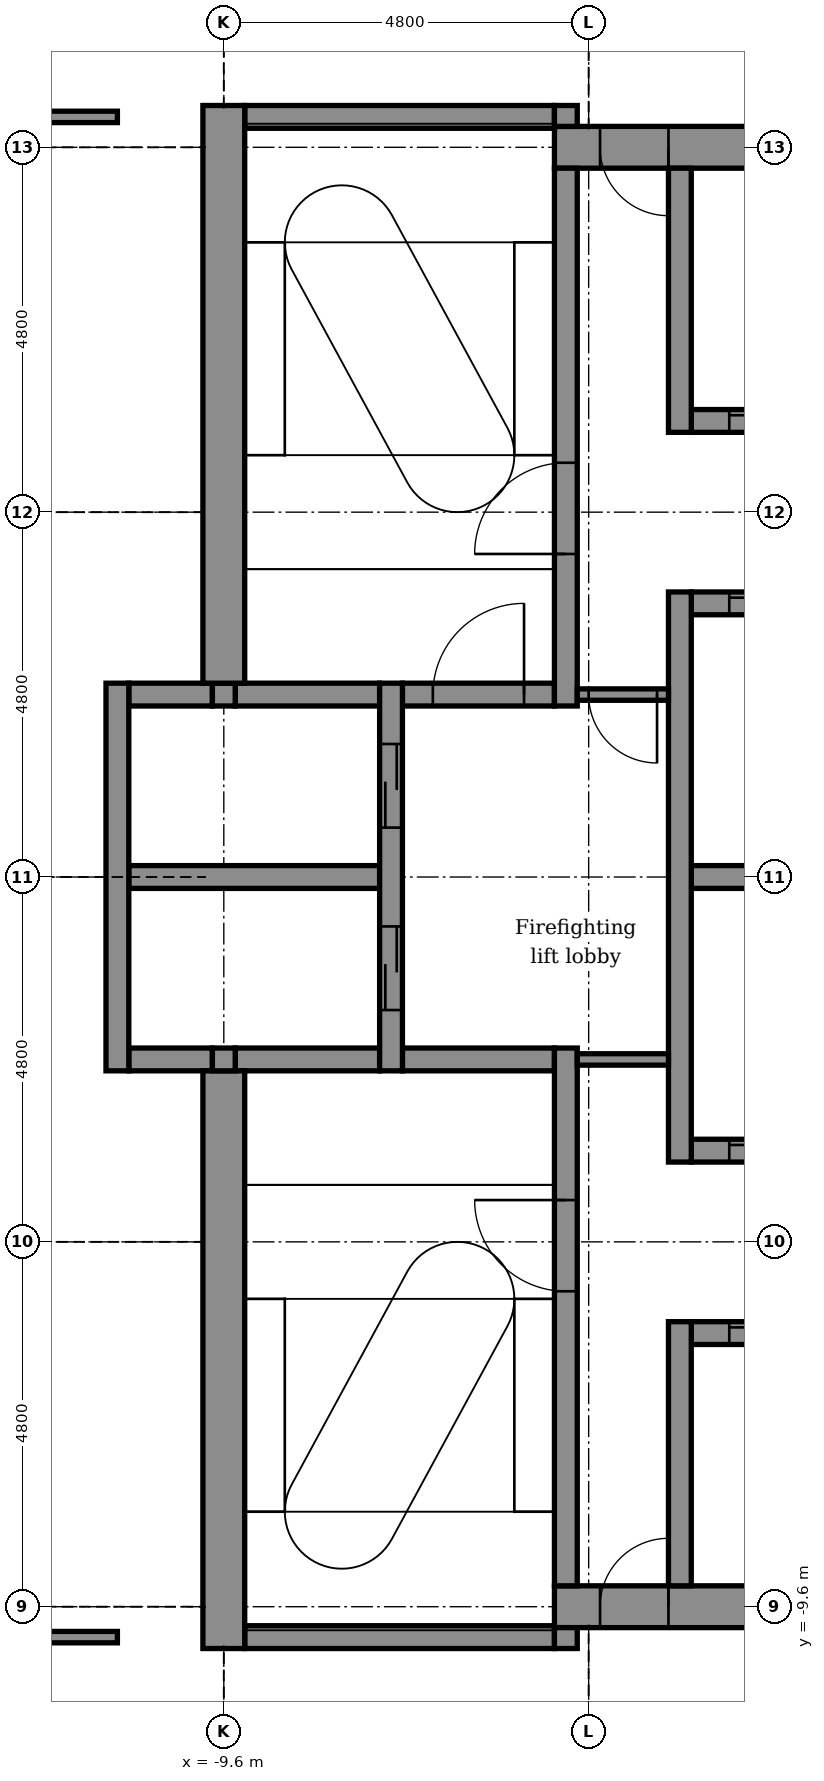
"""IFC4 building model, lengths in metres.
Left out: names, types, materials, properties, quantities, classifications, styles, units other than length and angle.
Written with IfcOpenShell. Run it as: python <this file> out.ifc"""

import sys

from ifc_helpers import new_model, si_unit, direction, frame, frame_2d, origin, place, context, subcontext, project, spatial, rectangle, extrude, element, fill, save


model = new_model("IFC4")
c1 = context("Model", 3, precision=1e-05, world=origin(), true_north=direction((0.0, 1.0)))
c2 = subcontext(c1, "Body", "Model", "MODEL_VIEW")
j1 = project(units=[si_unit("LENGTHUNIT", "METRE"), si_unit("PLANEANGLEUNIT", "RADIAN")], contexts=[c1])
p1 = place(None, origin())
s1 = spatial("IfcSite", under=j1, at=p1, CompositionType="ELEMENT")
p2 = place(p1, origin())
s2 = spatial("IfcBuilding", under=s1, at=p2, CompositionType="ELEMENT")
p3 = place(p2, frame((0.0, 0.0, 269.6)))
s3 = spatial("IfcBuildingStorey", under=s2, at=p3, CompositionType="ELEMENT", Elevation=269.6)
p4 = place(p3, frame((-9.325, -10.0, -0.15), z_axis=(0.0, 0.0, 1.0), x_axis=(1.0, 0.0, 0.0)))
e1 = element("IfcWall", 1, at=p4, inside=s3, PredefinedType="STANDARD", context=c2, shape_type="SweptSolid", body=[
    extrude(rectangle(XDim=4.075, YDim=0.3, at=frame_2d((2.038, 0.0))), origin(), (0.0, 0.0, 1.0), 3.9),
])
p5 = place(p3, frame((-5.25, -9.6, -0.15), z_axis=(0.0, 0.0, 1.0), x_axis=(1.0, 0.0, 0.0)))
e2 = element("IfcWall", 2, at=p5, inside=s3, PredefinedType="SHEAR", context=c2, shape_type="SweptSolid", body=[
    extrude(rectangle(XDim=10.2, YDim=0.55, at=frame_2d((5.1, 0.0))), origin(), (0.0, 0.0, 1.0), 3.9),
])
p6 = place(p5, frame((0.6, 0.0, 0.15)))
e3 = element("IfcOpeningElement", 3, at=p6, cuts=e2, PredefinedType="OPENING", context=c2, shape_type="SweptSolid", body=[
    extrude(rectangle(XDim=0.9, YDim=2.1, at=frame_2d((0.45, 1.05))), frame((0.0, 0.285, 0.0), z_axis=(0.0, -1.0, 0.0), x_axis=(1.0, 0.0, 0.0)), (0.0, 0.0, 1.0), 0.57),
])
p7 = place(p3, frame((-3.45, -6.0, -0.15), z_axis=(0.0, 0.0, 1.0), x_axis=(1.0, 0.0, 0.0)))
e4 = element("IfcWall", 4, at=p7, inside=s3, PredefinedType="STANDARD", context=c2, shape_type="SweptSolid", body=[
    extrude(rectangle(XDim=2.1, YDim=0.3, at=frame_2d((1.05, 0.0))), origin(), (0.0, 0.0, 1.0), 3.9),
])
p8 = place(p7, frame((0.5, 0.0, 0.15)))
e5 = element("IfcOpeningElement", 5, at=p8, cuts=e4, PredefinedType="OPENING", context=c2, shape_type="SweptSolid", body=[
    extrude(rectangle(XDim=1.1, YDim=2.1, at=frame_2d((0.55, 1.05))), frame((0.0, 0.16, 0.0), z_axis=(0.0, -1.0, 0.0), x_axis=(1.0, 0.0, 0.0)), (0.0, 0.0, 1.0), 0.32),
])
p9 = place(p3, frame((-3.45, -3.6, -0.15), z_axis=(0.0, 0.0, 1.0), x_axis=(1.0, 0.0, 0.0)))
e6 = element("IfcWall", 6, at=p9, inside=s3, PredefinedType="STANDARD", context=c2, shape_type="SweptSolid", body=[
    extrude(rectangle(XDim=2.1, YDim=0.3, at=frame_2d((1.05, 0.0))), origin(), (0.0, 0.0, 1.0), 3.9),
])
p10 = place(p9, frame((0.5, 0.0, 0.15)))
e7 = element("IfcOpeningElement", 7, at=p10, cuts=e6, PredefinedType="OPENING", context=c2, shape_type="SweptSolid", body=[
    extrude(rectangle(XDim=1.1, YDim=2.1, at=frame_2d((0.55, 1.05))), frame((0.0, 0.16, 0.0), z_axis=(0.0, -1.0, 0.0), x_axis=(1.0, 0.0, 0.0)), (0.0, 0.0, 1.0), 0.32),
])
p11 = place(p3, frame((-10.85, -2.4, -0.15), z_axis=(0.0, 0.0, 1.0), x_axis=(1.0, 0.0, 0.0)))
e8 = element("IfcWall", 8, at=p11, inside=s3, PredefinedType="STANDARD", context=c2, shape_type="SweptSolid", body=[
    extrude(rectangle(XDim=1.1, YDim=0.3, at=frame_2d((0.55, 0.0))), origin(), (0.0, 0.0, 1.0), 3.9),
])
p12 = place(p3, frame((-9.45, -2.4, -0.15), z_axis=(0.0, 0.0, 1.0), x_axis=(1.0, 0.0, 0.0)))
e9 = element("IfcWall", 9, at=p12, inside=s3, PredefinedType="STANDARD", context=c2, shape_type="SweptSolid", body=[
    extrude(rectangle(XDim=1.9, YDim=0.3, at=frame_2d((0.95, 0.0))), origin(), (0.0, 0.0, 1.0), 3.9),
])
p13 = place(p3, frame((-7.25, -2.4, -0.15), z_axis=(0.0, 0.0, 1.0), x_axis=(1.0, 0.0, 0.0)))
e10 = element("IfcWall", 10, at=p13, inside=s3, PredefinedType="STANDARD", context=c2, shape_type="SweptSolid", body=[
    extrude(rectangle(XDim=2.0, YDim=0.3, at=frame_2d((1.0, 0.0))), origin(), (0.0, 0.0, 1.0), 3.9),
])
p14 = place(p3, frame((-10.85, 0.0, -0.15), z_axis=(0.0, 0.0, 1.0), x_axis=(1.0, 0.0, 0.0)))
e11 = element("IfcWall", 11, at=p14, inside=s3, PredefinedType="STANDARD", context=c2, shape_type="SweptSolid", body=[
    extrude(rectangle(XDim=3.3, YDim=0.3, at=frame_2d((1.65, 0.0))), origin(), (0.0, 0.0, 1.0), 3.9),
])
p15 = place(p3, frame((-3.45, 0.0, -0.15), z_axis=(0.0, 0.0, 1.0), x_axis=(1.0, 0.0, 0.0)))
e12 = element("IfcWall", 12, at=p15, inside=s3, PredefinedType="STANDARD", context=c2, shape_type="SweptSolid", body=[
    extrude(rectangle(XDim=2.1, YDim=0.3, at=frame_2d((1.05, 0.0))), origin(), (0.0, 0.0, 1.0), 3.9),
])
p16 = place(p3, frame((-10.85, 2.4, -0.15), z_axis=(0.0, 0.0, 1.0), x_axis=(1.0, 0.0, 0.0)))
e13 = element("IfcWall", 13, at=p16, inside=s3, PredefinedType="STANDARD", context=c2, shape_type="SweptSolid", body=[
    extrude(rectangle(XDim=1.1, YDim=0.3, at=frame_2d((0.55, 0.0))), origin(), (0.0, 0.0, 1.0), 3.9),
])
p17 = place(p3, frame((-9.45, 2.4, -0.15), z_axis=(0.0, 0.0, 1.0), x_axis=(1.0, 0.0, 0.0)))
e14 = element("IfcWall", 14, at=p17, inside=s3, PredefinedType="STANDARD", context=c2, shape_type="SweptSolid", body=[
    extrude(rectangle(XDim=1.9, YDim=0.3, at=frame_2d((0.95, 0.0))), origin(), (0.0, 0.0, 1.0), 3.9),
])
p18 = place(p3, frame((-7.25, 2.4, -0.15), z_axis=(0.0, 0.0, 1.0), x_axis=(1.0, 0.0, 0.0)))
e15 = element("IfcWall", 15, at=p18, inside=s3, PredefinedType="STANDARD", context=c2, shape_type="SweptSolid", body=[
    extrude(rectangle(XDim=2.0, YDim=0.3, at=frame_2d((1.0, 0.0))), origin(), (0.0, 0.0, 1.0), 3.9),
])
p19 = place(p18, frame((0.4, 0.0, 0.15)))
e16 = element("IfcOpeningElement", 16, at=p19, cuts=e15, PredefinedType="OPENING", context=c2, shape_type="SweptSolid", body=[
    extrude(rectangle(XDim=1.2, YDim=2.1, at=frame_2d((0.6, 1.05))), frame((0.0, 0.16, 0.0), z_axis=(0.0, -1.0, 0.0), x_axis=(1.0, 0.0, 0.0)), (0.0, 0.0, 1.0), 0.32),
])
p20 = place(p3, frame((-3.45, 3.6, -0.15), z_axis=(0.0, 0.0, 1.0), x_axis=(1.0, 0.0, 0.0)))
e17 = element("IfcWall", 17, at=p20, inside=s3, PredefinedType="STANDARD", context=c2, shape_type="SweptSolid", body=[
    extrude(rectangle(XDim=2.1, YDim=0.3, at=frame_2d((1.05, 0.0))), origin(), (0.0, 0.0, 1.0), 3.9),
])
p21 = place(p20, frame((0.5, 0.0, 0.15)))
e18 = element("IfcOpeningElement", 18, at=p21, cuts=e17, PredefinedType="OPENING", context=c2, shape_type="SweptSolid", body=[
    extrude(rectangle(XDim=1.1, YDim=2.1, at=frame_2d((0.55, 1.05))), frame((0.0, 0.16, 0.0), z_axis=(0.0, -1.0, 0.0), x_axis=(1.0, 0.0, 0.0)), (0.0, 0.0, 1.0), 0.32),
])
p22 = place(p3, frame((-3.45, 6.0, -0.15), z_axis=(0.0, 0.0, 1.0), x_axis=(1.0, 0.0, 0.0)))
e19 = element("IfcWall", 19, at=p22, inside=s3, PredefinedType="STANDARD", context=c2, shape_type="SweptSolid", body=[
    extrude(rectangle(XDim=2.1, YDim=0.3, at=frame_2d((1.05, 0.0))), origin(), (0.0, 0.0, 1.0), 3.9),
])
p23 = place(p22, frame((0.5, 0.0, 0.15)))
e20 = element("IfcOpeningElement", 20, at=p23, cuts=e19, PredefinedType="OPENING", context=c2, shape_type="SweptSolid", body=[
    extrude(rectangle(XDim=1.1, YDim=2.1, at=frame_2d((0.55, 1.05))), frame((0.0, 0.16, 0.0), z_axis=(0.0, -1.0, 0.0), x_axis=(1.0, 0.0, 0.0)), (0.0, 0.0, 1.0), 0.32),
])
p24 = place(p3, frame((-5.25, 9.6, -0.15), z_axis=(0.0, 0.0, 1.0), x_axis=(1.0, 0.0, 0.0)))
e21 = element("IfcWall", 21, at=p24, inside=s3, PredefinedType="SHEAR", context=c2, shape_type="SweptSolid", body=[
    extrude(rectangle(XDim=14.575, YDim=0.55, at=frame_2d((7.288, 0.0))), origin(), (0.0, 0.0, 1.0), 3.9),
])
p25 = place(p24, frame((0.6, 0.0, 0.15)))
e22 = element("IfcOpeningElement", 22, at=p25, cuts=e21, PredefinedType="OPENING", context=c2, shape_type="SweptSolid", body=[
    extrude(rectangle(XDim=0.9, YDim=2.1, at=frame_2d((0.45, 1.05))), frame((0.0, 0.285, 0.0), z_axis=(0.0, -1.0, 0.0), x_axis=(1.0, 0.0, 0.0)), (0.0, 0.0, 1.0), 0.57),
])
p26 = place(p3, frame((-9.325, 10.0, -0.15), z_axis=(0.0, 0.0, 1.0), x_axis=(1.0, 0.0, 0.0)))
e23 = element("IfcWall", 23, at=p26, inside=s3, PredefinedType="STANDARD", context=c2, shape_type="SweptSolid", body=[
    extrude(rectangle(XDim=4.075, YDim=0.3, at=frame_2d((2.038, 0.0))), origin(), (0.0, 0.0, 1.0), 3.9),
])
p27 = place(p3, frame((-11.0, -2.55, -0.15), z_axis=(0.0, 0.0, 1.0), x_axis=(0.0, 1.0, 0.0)))
e24 = element("IfcWall", 24, at=p27, inside=s3, PredefinedType="STANDARD", context=c2, shape_type="SweptSolid", body=[
    extrude(rectangle(XDim=5.1, YDim=0.3, at=frame_2d((2.55, 0.0))), origin(), (0.0, 0.0, 1.0), 3.9),
])
p28 = place(p3, frame((-9.6, -10.15, -0.15), z_axis=(0.0, 0.0, 1.0), x_axis=(0.0, 1.0, 0.0)))
e25 = element("IfcWall", 25, at=p28, inside=s3, PredefinedType="SHEAR", context=c2, shape_type="SweptSolid", body=[
    extrude(rectangle(XDim=7.6, YDim=0.55, at=frame_2d((3.8, 0.0))), origin(), (0.0, 0.0, 1.0), 3.9),
])
for number, where, z_axis, x_axis in (
    (26, (-9.6, -2.55, -0.15), (0.0, 0.0, 1.0), (0.0, 1.0, 0.0)),
    (27, (-9.6, 2.25, -0.15), (0.0, 0.0, 1.0), (0.0, 1.0, 0.0)),
):
    element("IfcWall", number, at=place(p3, frame(where, z_axis=z_axis, x_axis=x_axis)), inside=s3, PredefinedType="STANDARD", context=c2, shape_type="SweptSolid", body=[
        extrude(rectangle(XDim=0.3, YDim=0.3, at=frame_2d((0.15, 0.0))), origin(), (0.0, 0.0, 1.0), 3.9),
    ])
p29 = place(p3, frame((-9.6, 2.55, -0.15), z_axis=(0.0, 0.0, 1.0), x_axis=(0.0, 1.0, 0.0)))
e28 = element("IfcWall", 28, at=p29, inside=s3, PredefinedType="SHEAR", context=c2, shape_type="SweptSolid", body=[
    extrude(rectangle(XDim=7.6, YDim=0.55, at=frame_2d((3.8, 0.0))), origin(), (0.0, 0.0, 1.0), 3.9),
])
p30 = place(p3, frame((-7.4, -2.55, -0.15), z_axis=(0.0, 0.0, 1.0), x_axis=(0.0, 1.0, 0.0)))
e29 = element("IfcWall", 29, at=p30, inside=s3, PredefinedType="STANDARD", context=c2, shape_type="SweptSolid", body=[
    extrude(rectangle(XDim=5.1, YDim=0.3, at=frame_2d((2.55, 0.0))), origin(), (0.0, 0.0, 1.0), 3.9),
])
p31 = place(p30, frame((0.8, 0.0, 0.15)))
e30 = element("IfcOpeningElement", 30, at=p31, cuts=e29, PredefinedType="OPENING", context=c2, shape_type="SweptSolid", body=[
    extrude(rectangle(XDim=1.1, YDim=2.1, at=frame_2d((0.55, 1.05))), frame((0.0, 0.16, 0.0), z_axis=(0.0, -1.0, 0.0), x_axis=(1.0, 0.0, 0.0)), (0.0, 0.0, 1.0), 0.32),
])
p32 = place(p30, frame((3.2, 0.0, 0.15)))
e31 = element("IfcOpeningElement", 31, at=p32, cuts=e29, PredefinedType="OPENING", context=c2, shape_type="SweptSolid", body=[
    extrude(rectangle(XDim=1.1, YDim=2.1, at=frame_2d((0.55, 1.05))), frame((0.0, 0.16, 0.0), z_axis=(0.0, -1.0, 0.0), x_axis=(1.0, 0.0, 0.0)), (0.0, 0.0, 1.0), 0.32),
])
p33 = place(p3, frame((-5.1, -10.15, -0.15), z_axis=(0.0, 0.0, 1.0), x_axis=(0.0, 1.0, 0.0)))
e32 = element("IfcWall", 32, at=p33, inside=s3, PredefinedType="STANDARD", context=c2, shape_type="SweptSolid", body=[
    extrude(rectangle(XDim=0.275, YDim=0.3, at=frame_2d((0.137, 0.0))), origin(), (0.0, 0.0, 1.0), 3.9),
])
p34 = place(p3, frame((-5.1, -9.325, -0.15), z_axis=(0.0, 0.0, 1.0), x_axis=(0.0, 1.0, 0.0)))
e33 = element("IfcWall", 33, at=p34, inside=s3, PredefinedType="STANDARD", context=c2, shape_type="SweptSolid", body=[
    extrude(rectangle(XDim=7.075, YDim=0.3, at=frame_2d((3.538, 0.0))), origin(), (0.0, 0.0, 1.0), 3.9),
])
p35 = place(p34, frame((3.875, 0.0, 0.15)))
e34 = element("IfcOpeningElement", 34, at=p35, cuts=e33, PredefinedType="OPENING", context=c2, shape_type="SweptSolid", body=[
    extrude(rectangle(XDim=1.2, YDim=2.1, at=frame_2d((0.6, 1.05))), frame((0.0, 0.16, 0.0), z_axis=(0.0, -1.0, 0.0), x_axis=(1.0, 0.0, 0.0)), (0.0, 0.0, 1.0), 0.32),
])
p36 = place(p3, frame((-5.1, 2.25, -0.15), z_axis=(0.0, 0.0, 1.0), x_axis=(0.0, 1.0, 0.0)))
e35 = element("IfcWall", 35, at=p36, inside=s3, PredefinedType="STANDARD", context=c2, shape_type="SweptSolid", body=[
    extrude(rectangle(XDim=7.075, YDim=0.3, at=frame_2d((3.538, 0.0))), origin(), (0.0, 0.0, 1.0), 3.9),
])
p37 = place(p36, frame((2.0, 0.0, 0.15)))
e36 = element("IfcOpeningElement", 36, at=p37, cuts=e35, PredefinedType="OPENING", context=c2, shape_type="SweptSolid", body=[
    extrude(rectangle(XDim=1.2, YDim=2.1, at=frame_2d((0.6, 1.05))), frame((0.0, 0.16, 0.0), z_axis=(0.0, -1.0, 0.0), x_axis=(1.0, 0.0, 0.0)), (0.0, 0.0, 1.0), 0.32),
])
p38 = place(p3, frame((-5.1, 9.875, -0.15), z_axis=(0.0, 0.0, 1.0), x_axis=(0.0, 1.0, 0.0)))
e37 = element("IfcWall", 37, at=p38, inside=s3, PredefinedType="STANDARD", context=c2, shape_type="SweptSolid", body=[
    extrude(rectangle(XDim=0.275, YDim=0.3, at=frame_2d((0.137, 0.0))), origin(), (0.0, 0.0, 1.0), 3.9),
])
p39 = place(p3, frame((-3.6, -9.325, -0.15), z_axis=(0.0, 0.0, 1.0), x_axis=(0.0, 1.0, 0.0)))
e38 = element("IfcWall", 38, at=p39, inside=s3, PredefinedType="STANDARD", context=c2, shape_type="SweptSolid", body=[
    extrude(rectangle(XDim=3.475, YDim=0.3, at=frame_2d((1.737, 0.0))), origin(), (0.0, 0.0, 1.0), 3.9),
])
p40 = place(p3, frame((-3.6, -3.75, -0.15), z_axis=(0.0, 0.0, 1.0), x_axis=(0.0, 1.0, 0.0)))
e39 = element("IfcWall", 39, at=p40, inside=s3, PredefinedType="STANDARD", context=c2, shape_type="SweptSolid", body=[
    extrude(rectangle(XDim=7.5, YDim=0.3, at=frame_2d((3.75, 0.0))), origin(), (0.0, 0.0, 1.0), 3.9),
])
p41 = place(p3, frame((-3.6, 5.85, -0.15), z_axis=(0.0, 0.0, 1.0), x_axis=(0.0, 1.0, 0.0)))
e40 = element("IfcWall", 40, at=p41, inside=s3, PredefinedType="STANDARD", context=c2, shape_type="SweptSolid", body=[
    extrude(rectangle(XDim=3.475, YDim=0.3, at=frame_2d((1.737, 0.0))), origin(), (0.0, 0.0, 1.0), 3.9),
])
for number, where, z_axis, x_axis in (
    (41, (-14.555, -10.0, 0.0), (0.0, 0.0, 1.0), (1.0, 0.0, 0.0)),
    (42, (-14.555, 10.0, 0.0), (0.0, 0.0, 1.0), (1.0, 0.0, 0.0)),
):
    element("IfcWall", number, at=place(p3, frame(where, z_axis=z_axis, x_axis=x_axis)), inside=s3, PredefinedType="PARTITIONING", context=c2, shape_type="SweptSolid", body=[
        extrude(rectangle(XDim=3.555, YDim=0.15, at=frame_2d((1.777, 0.0))), origin(), (0.0, 0.0, 1.0), 3.75),
    ])
p42 = place(p3, frame((-4.95, 2.4, 0.0), z_axis=(0.0, 0.0, 1.0), x_axis=(1.0, 0.0, 0.0)))
e43 = element("IfcWall", 43, at=p42, inside=s3, PredefinedType="PARTITIONING", context=c2, shape_type="SweptSolid", body=[
    extrude(rectangle(XDim=1.2, YDim=0.15, at=frame_2d((0.6, 0.0))), origin(), (0.0, 0.0, 1.0), 3.75),
])
p43 = place(p42, frame((0.15, 0.0, 0.0)))
e44 = element("IfcOpeningElement", 44, at=p43, cuts=e43, PredefinedType="OPENING", context=c2, shape_type="SweptSolid", body=[
    extrude(rectangle(XDim=0.9, YDim=2.1, at=frame_2d((0.45, 1.05))), frame((0.0, 0.085, 0.0), z_axis=(0.0, -1.0, 0.0), x_axis=(1.0, 0.0, 0.0)), (0.0, 0.0, 1.0), 0.17),
])
p44 = place(p3, frame((-4.95, -2.4, 0.0), z_axis=(0.0, 0.0, 1.0), x_axis=(1.0, 0.0, 0.0)))
e45 = element("IfcWall", 45, at=p44, inside=s3, PredefinedType="PARTITIONING", context=c2, shape_type="SweptSolid", body=[
    extrude(rectangle(XDim=1.2, YDim=0.15, at=frame_2d((0.6, 0.0))), origin(), (0.0, 0.0, 1.0), 3.75),
])
p45 = place(p31, origin())
e46 = element("IfcDoor", 46, at=p45, inside=s3, OperationType="DOUBLE_DOOR_SLIDING", PredefinedType="DOOR", context=c2, shape_type="SweptSolid", body=[
    extrude(rectangle(XDim=1.1, YDim=2.1, at=frame_2d((0.55, 1.05))), frame((0.0, 0.025, 0.0), z_axis=(0.0, -1.0, 0.0), x_axis=(1.0, 0.0, 0.0)), (0.0, 0.0, 1.0), 0.05),
])
fill(e30, e46)
p46 = place(p32, origin())
e47 = element("IfcDoor", 47, at=p46, inside=s3, OperationType="DOUBLE_DOOR_SLIDING", PredefinedType="DOOR", context=c2, shape_type="SweptSolid", body=[
    extrude(rectangle(XDim=1.1, YDim=2.1, at=frame_2d((0.55, 1.05))), frame((0.0, 0.025, 0.0), z_axis=(0.0, -1.0, 0.0), x_axis=(1.0, 0.0, 0.0)), (0.0, 0.0, 1.0), 0.05),
])
fill(e31, e47)
p47 = place(p23, origin())
e48 = element("IfcDoor", 48, at=p47, inside=s3, OperationType="DOUBLE_DOOR_SLIDING", PredefinedType="DOOR", context=c2, shape_type="SweptSolid", body=[
    extrude(rectangle(XDim=1.1, YDim=2.1, at=frame_2d((0.55, 1.05))), frame((0.0, 0.025, 0.0), z_axis=(0.0, -1.0, 0.0), x_axis=(1.0, 0.0, 0.0)), (0.0, 0.0, 1.0), 0.05),
])
fill(e20, e48)
p48 = place(p21, origin())
e49 = element("IfcDoor", 49, at=p48, inside=s3, OperationType="DOUBLE_DOOR_SLIDING", PredefinedType="DOOR", context=c2, shape_type="SweptSolid", body=[
    extrude(rectangle(XDim=1.1, YDim=2.1, at=frame_2d((0.55, 1.05))), frame((0.0, 0.025, 0.0), z_axis=(0.0, -1.0, 0.0), x_axis=(1.0, 0.0, 0.0)), (0.0, 0.0, 1.0), 0.05),
])
fill(e18, e49)
p49 = place(p10, origin())
e50 = element("IfcDoor", 50, at=p49, inside=s3, OperationType="DOUBLE_DOOR_SLIDING", PredefinedType="DOOR", context=c2, shape_type="SweptSolid", body=[
    extrude(rectangle(XDim=1.1, YDim=2.1, at=frame_2d((0.55, 1.05))), frame((0.0, 0.025, 0.0), z_axis=(0.0, -1.0, 0.0), x_axis=(1.0, 0.0, 0.0)), (0.0, 0.0, 1.0), 0.05),
])
fill(e7, e50)
p50 = place(p8, origin())
e51 = element("IfcDoor", 51, at=p50, inside=s3, OperationType="DOUBLE_DOOR_SLIDING", PredefinedType="DOOR", context=c2, shape_type="SweptSolid", body=[
    extrude(rectangle(XDim=1.1, YDim=2.1, at=frame_2d((0.55, 1.05))), frame((0.0, 0.025, 0.0), z_axis=(0.0, -1.0, 0.0), x_axis=(1.0, 0.0, 0.0)), (0.0, 0.0, 1.0), 0.05),
])
fill(e5, e51)
p51 = place(p37, origin())
e52 = element("IfcDoor", 52, at=p51, inside=s3, OperationType="SINGLE_SWING_LEFT", PredefinedType="DOOR", context=c2, shape_type="SweptSolid", body=[
    extrude(rectangle(XDim=1.2, YDim=2.1, at=frame_2d((0.6, 1.05))), frame((0.0, 0.025, 0.0), z_axis=(0.0, -1.0, 0.0), x_axis=(1.0, 0.0, 0.0)), (0.0, 0.0, 1.0), 0.05),
])
fill(e36, e52)
p52 = place(p35, origin())
e53 = element("IfcDoor", 53, at=p52, inside=s3, OperationType="SINGLE_SWING_RIGHT", PredefinedType="DOOR", context=c2, shape_type="SweptSolid", body=[
    extrude(rectangle(XDim=1.2, YDim=2.1, at=frame_2d((0.6, 1.05))), frame((0.0, 0.025, 0.0), z_axis=(0.0, -1.0, 0.0), x_axis=(1.0, 0.0, 0.0)), (0.0, 0.0, 1.0), 0.05),
])
fill(e34, e53)
p53 = place(p25, frame((0.9, 0.0, 0.0), z_axis=(0.0, 0.0, 1.0), x_axis=(-1.0, 0.0, 0.0)))
e54 = element("IfcDoor", 54, at=p53, inside=s3, OperationType="SINGLE_SWING_RIGHT", PredefinedType="DOOR", context=c2, shape_type="SweptSolid", body=[
    extrude(rectangle(XDim=0.9, YDim=2.1, at=frame_2d((0.45, 1.05))), frame((0.0, 0.025, 0.0), z_axis=(0.0, -1.0, 0.0), x_axis=(1.0, 0.0, 0.0)), (0.0, 0.0, 1.0), 0.05),
])
fill(e22, e54)
p54 = place(p6, origin())
e55 = element("IfcDoor", 55, at=p54, inside=s3, OperationType="SINGLE_SWING_RIGHT", PredefinedType="DOOR", context=c2, shape_type="SweptSolid", body=[
    extrude(rectangle(XDim=0.9, YDim=2.1, at=frame_2d((0.45, 1.05))), frame((0.0, 0.025, 0.0), z_axis=(0.0, -1.0, 0.0), x_axis=(1.0, 0.0, 0.0)), (0.0, 0.0, 1.0), 0.05),
])
fill(e3, e55)
p55 = place(p43, frame((0.9, 0.0, 0.0), z_axis=(0.0, 0.0, 1.0), x_axis=(-1.0, 0.0, 0.0)))
e56 = element("IfcDoor", 56, at=p55, inside=s3, OperationType="SINGLE_SWING_RIGHT", PredefinedType="DOOR", context=c2, shape_type="SweptSolid", body=[
    extrude(rectangle(XDim=0.9, YDim=2.1, at=frame_2d((0.45, 1.05))), frame((0.0, 0.025, 0.0), z_axis=(0.0, -1.0, 0.0), x_axis=(1.0, 0.0, 0.0)), (0.0, 0.0, 1.0), 0.05),
])
fill(e44, e56)
p56 = place(p19, origin())
e57 = element("IfcDoor", 57, at=p56, inside=s3, OperationType="SINGLE_SWING_RIGHT", PredefinedType="DOOR", context=c2, shape_type="SweptSolid", body=[
    extrude(rectangle(XDim=1.2, YDim=2.1, at=frame_2d((0.6, 1.05))), frame((0.0, 0.025, 0.0), z_axis=(0.0, -1.0, 0.0), x_axis=(1.0, 0.0, 0.0)), (0.0, 0.0, 1.0), 0.05),
])
fill(e16, e57)
save(model, sys.argv[1])
